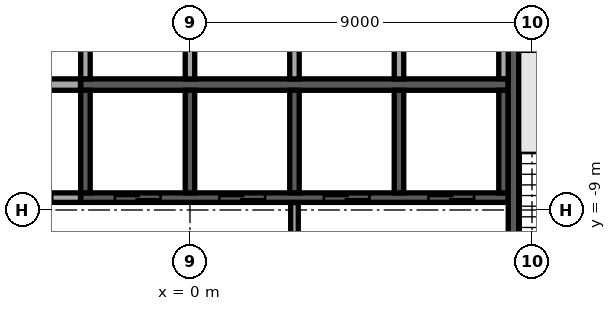
"""IFC4 building model, lengths in metres.
Left out: names, types, materials, properties, quantities, classifications, styles, units other than length and angle.
Written with IfcOpenShell. Run it as: python <this file> out.ifc"""

import sys

from ifc_helpers import new_model, si_unit, direction, frame, frame_2d, origin, place, context, subcontext, project, spatial, rectangle, extrude, element, fill, save


model = new_model("IFC4")
c1 = context("Model", 3, precision=1e-05, world=origin(), true_north=direction((0.0, 1.0)))
c2 = subcontext(c1, "Body", "Model", "MODEL_VIEW")
j1 = project(units=[si_unit("LENGTHUNIT", "METRE"), si_unit("PLANEANGLEUNIT", "RADIAN")], contexts=[c1])
p1 = place(None, origin())
s1 = spatial("IfcSite", under=j1, at=p1, CompositionType="ELEMENT")
p2 = place(p1, origin())
s2 = spatial("IfcBuilding", under=s1, at=p2, CompositionType="ELEMENT")
p3 = place(p2, frame((0.0, 0.0, 197.3)))
s3 = spatial("IfcBuildingStorey", under=s2, at=p3, CompositionType="ELEMENT", Elevation=197.3)
p4 = place(p3, frame((-2.875, -5.7, 0.0), z_axis=(0.0, 0.0, 1.0), x_axis=(1.0, 0.0, 0.0)))
e1 = element("IfcWall", 1, at=p4, inside=s3, PredefinedType="SOLIDWALL", context=c2, shape_type="SweptSolid", body=[
    extrude(rectangle(XDim=11.25, YDim=0.3, at=frame_2d((5.625, 0.0))), origin(), (0.0, 0.0, 1.0), 3.62),
])
for number, where, z_axis, x_axis in (
    (2, (-2.75, -5.55, 0.0), (0.0, 0.0, 1.0), (0.0, 1.0, 0.0)),
    (3, (0.0, -5.55, 0.0), (0.0, 0.0, 1.0), (0.0, 1.0, 0.0)),
    (4, (2.75, -5.55, 0.0), (0.0, 0.0, 1.0), (0.0, 1.0, 0.0)),
    (5, (5.5, -5.55, 0.0), (0.0, 0.0, 1.0), (0.0, 1.0, 0.0)),
):
    element("IfcWall", number, at=place(p3, frame(where, z_axis=z_axis, x_axis=x_axis)), inside=s3, PredefinedType="SOLIDWALL", context=c2, shape_type="SweptSolid", body=[
        extrude(rectangle(XDim=2.7, YDim=0.25, at=frame_2d((1.35, 0.0))), origin(), (0.0, 0.0, 1.0), 3.62),
    ])
p5 = place(p3, frame((-2.875, -8.675, 0.0), z_axis=(0.0, 0.0, 1.0), x_axis=(1.0, 0.0, 0.0)))
e6 = element("IfcWall", 6, at=p5, inside=s3, PredefinedType="SOLIDWALL", context=c2, shape_type="SweptSolid", body=[
    extrude(rectangle(XDim=11.25, YDim=0.25, at=frame_2d((5.625, 0.0))), origin(), (0.0, 0.0, 1.0), 3.62),
])
p6 = place(p5, frame((0.9, 0.0, 0.0)))
e7 = element("IfcOpeningElement", 7, at=p6, cuts=e6, PredefinedType="OPENING", context=c2, shape_type="SweptSolid", body=[
    extrude(rectangle(XDim=1.2, YDim=2.1, at=frame_2d((0.6, 1.05))), frame((0.0, 0.135, 0.0), z_axis=(0.0, -1.0, 0.0), x_axis=(1.0, 0.0, 0.0)), (0.0, 0.0, 1.0), 0.27),
])
p7 = place(p5, frame((3.65, 0.0, 0.0)))
e8 = element("IfcOpeningElement", 8, at=p7, cuts=e6, PredefinedType="OPENING", context=c2, shape_type="SweptSolid", body=[
    extrude(rectangle(XDim=1.2, YDim=2.1, at=frame_2d((0.6, 1.05))), frame((0.0, 0.135, 0.0), z_axis=(0.0, -1.0, 0.0), x_axis=(1.0, 0.0, 0.0)), (0.0, 0.0, 1.0), 0.27),
])
p8 = place(p5, frame((6.4, 0.0, 0.0)))
e9 = element("IfcOpeningElement", 9, at=p8, cuts=e6, PredefinedType="OPENING", context=c2, shape_type="SweptSolid", body=[
    extrude(rectangle(XDim=1.2, YDim=2.1, at=frame_2d((0.6, 1.05))), frame((0.0, 0.135, 0.0), z_axis=(0.0, -1.0, 0.0), x_axis=(1.0, 0.0, 0.0)), (0.0, 0.0, 1.0), 0.27),
])
p9 = place(p5, frame((9.15, 0.0, 0.0)))
e10 = element("IfcOpeningElement", 10, at=p9, cuts=e6, PredefinedType="OPENING", context=c2, shape_type="SweptSolid", body=[
    extrude(rectangle(XDim=1.2, YDim=2.1, at=frame_2d((0.6, 1.05))), frame((0.0, 0.135, 0.0), z_axis=(0.0, -1.0, 0.0), x_axis=(1.0, 0.0, 0.0)), (0.0, 0.0, 1.0), 0.27),
])
for number, where, z_axis, x_axis in (
    (11, (-2.75, -8.55, 0.0), (0.0, 0.0, 1.0), (0.0, 1.0, 0.0)),
    (12, (0.0, -8.55, 0.0), (0.0, 0.0, 1.0), (0.0, 1.0, 0.0)),
    (13, (2.75, -8.55, 0.0), (0.0, 0.0, 1.0), (0.0, 1.0, 0.0)),
    (14, (5.5, -8.55, 0.0), (0.0, 0.0, 1.0), (0.0, 1.0, 0.0)),
    (15, (8.25, -8.55, 0.0), (0.0, 0.0, 1.0), (0.0, 1.0, 0.0)),
):
    element("IfcWall", number, at=place(p3, frame(where, z_axis=z_axis, x_axis=x_axis)), inside=s3, PredefinedType="SOLIDWALL", context=c2, shape_type="SweptSolid", body=[
        extrude(rectangle(XDim=2.7, YDim=0.25, at=frame_2d((1.35, 0.0))), origin(), (0.0, 0.0, 1.0), 3.62),
    ])
p10 = place(p3, frame((8.512, -4.55, 0.0), z_axis=(0.0, 0.0, 1.0), x_axis=(0.0, -1.0, 0.0)))
e16 = element("IfcWall", 16, at=p10, inside=s3, PredefinedType="SOLIDWALL", context=c2, shape_type="SweptSolid", body=[
    extrude(rectangle(XDim=7.25, YDim=0.275, at=frame_2d((3.625, 0.0))), origin(), (0.0, 0.0, 1.0), 3.62),
])
p11 = place(p10, frame((6.0, 0.0, 0.0)))
e17 = element("IfcOpeningElement", 17, at=p11, cuts=e16, PredefinedType="OPENING", context=c2, shape_type="SweptSolid", body=[
    extrude(rectangle(XDim=1.0, YDim=2.1, at=frame_2d((0.5, 1.05))), frame((0.0, 0.147, 0.0), z_axis=(0.0, -1.0, 0.0), x_axis=(1.0, 0.0, 0.0)), (0.0, 0.0, 1.0), 0.295),
])
p12 = place(p3, frame((2.75, -11.795, 0.0), z_axis=(0.0, 0.0, 1.0), x_axis=(0.0, 1.0, 0.0)))
e18 = element("IfcWall", 18, at=p12, inside=s3, PredefinedType="PARTITIONING", context=c2, shape_type="SweptSolid", body=[
    extrude(rectangle(XDim=2.99, YDim=0.2, at=frame_2d((1.495, 0.0))), origin(), (0.0, 0.0, 1.0), 3.62),
])
p13 = place(p3, frame((-8.37, -8.675, 0.0), z_axis=(0.0, 0.0, 1.0), x_axis=(1.0, 0.0, 0.0)))
e19 = element("IfcWall", 19, at=p13, inside=s3, PredefinedType="PARTITIONING", context=c2, shape_type="SweptSolid", body=[
    extrude(rectangle(XDim=5.49, YDim=0.25, at=frame_2d((2.745, 0.0))), origin(), (0.0, 0.0, 1.0), 3.62),
])
p14 = place(p13, frame((0.995, 0.0, 0.0)))
e20 = element("IfcOpeningElement", 20, at=p14, cuts=e19, PredefinedType="OPENING", context=c2, shape_type="SweptSolid", body=[
    extrude(rectangle(XDim=1.0, YDim=2.1, at=frame_2d((0.5, 1.05))), frame((0.0, 0.135, 0.0), z_axis=(0.0, -1.0, 0.0), x_axis=(1.0, 0.0, 0.0)), (0.0, 0.0, 1.0), 0.27),
])
p15 = place(p13, frame((3.745, 0.0, 0.0)))
e21 = element("IfcOpeningElement", 21, at=p15, cuts=e19, PredefinedType="OPENING", context=c2, shape_type="SweptSolid", body=[
    extrude(rectangle(XDim=1.0, YDim=2.1, at=frame_2d((0.5, 1.05))), frame((0.0, 0.135, 0.0), z_axis=(0.0, -1.0, 0.0), x_axis=(1.0, 0.0, 0.0)), (0.0, 0.0, 1.0), 0.27),
])
p16 = place(p3, frame((-8.35, -5.7, 0.0), z_axis=(0.0, 0.0, 1.0), x_axis=(1.0, 0.0, 0.0)))
e22 = element("IfcWall", 22, at=p16, inside=s3, PredefinedType="PARTITIONING", context=c2, shape_type="SweptSolid", body=[
    extrude(rectangle(XDim=5.47, YDim=0.3, at=frame_2d((2.735, 0.0))), origin(), (0.0, 0.0, 1.0), 3.62),
])
p17 = place(p3, frame((8.25, -5.545, 0.0), z_axis=(0.0, 0.0, 1.0), x_axis=(0.0, 1.0, 0.0)))
e23 = element("IfcWall", 23, at=p17, inside=s3, PredefinedType="PARTITIONING", context=c2, shape_type="SweptSolid", body=[
    extrude(rectangle(XDim=2.69, YDim=0.25, at=frame_2d((1.345, 0.0))), origin(), (0.0, 0.0, 1.0), 3.62),
])
p18 = place(p3, frame((-1.073, -34.773, 0.0), z_axis=(0.0, 0.0, 1.0), x_axis=(0.731351780381, 0.682000420333, 0.0)))
e24 = element("IfcWall", 24, at=p18, inside=s3, PredefinedType="STANDARD", context=c2, shape_type="SweptSolid", body=[
    extrude(rectangle(XDim=49.0, YDim=0.6, at=frame_2d((24.5, 0.0))), origin(), (0.0, 0.0, 1.0), 3.62),
])
p19 = place(p18, frame((1.227, 0.0, 0.9)))
e25 = element("IfcOpeningElement", 25, at=p19, cuts=e24, PredefinedType="OPENING", context=c2, shape_type="SweptSolid", body=[
    extrude(rectangle(XDim=2.0, YDim=2.1, at=frame_2d((1.0, 1.05))), frame((0.0, 0.31, 0.0), z_axis=(0.0, -1.0, 0.0), x_axis=(1.0, 0.0, 0.0)), (0.0, 0.0, 1.0), 0.62),
])
p20 = place(p18, frame((5.682, 0.0, 0.9)))
e26 = element("IfcOpeningElement", 26, at=p20, cuts=e24, PredefinedType="OPENING", context=c2, shape_type="SweptSolid", body=[
    extrude(rectangle(XDim=2.0, YDim=2.1, at=frame_2d((1.0, 1.05))), frame((0.0, 0.31, 0.0), z_axis=(0.0, -1.0, 0.0), x_axis=(1.0, 0.0, 0.0)), (0.0, 0.0, 1.0), 0.62),
])
p21 = place(p18, frame((14.591, 0.0, 0.9)))
e27 = element("IfcOpeningElement", 27, at=p21, cuts=e24, PredefinedType="OPENING", context=c2, shape_type="SweptSolid", body=[
    extrude(rectangle(XDim=2.0, YDim=2.1, at=frame_2d((1.0, 1.05))), frame((0.0, 0.31, 0.0), z_axis=(0.0, -1.0, 0.0), x_axis=(1.0, 0.0, 0.0)), (0.0, 0.0, 1.0), 0.62),
])
p22 = place(p18, frame((19.045, 0.0, 0.9)))
e28 = element("IfcOpeningElement", 28, at=p22, cuts=e24, PredefinedType="OPENING", context=c2, shape_type="SweptSolid", body=[
    extrude(rectangle(XDim=2.0, YDim=2.1, at=frame_2d((1.0, 1.05))), frame((0.0, 0.31, 0.0), z_axis=(0.0, -1.0, 0.0), x_axis=(1.0, 0.0, 0.0)), (0.0, 0.0, 1.0), 0.62),
])
p23 = place(p18, frame((23.5, 0.0, 0.9)))
e29 = element("IfcOpeningElement", 29, at=p23, cuts=e24, PredefinedType="OPENING", context=c2, shape_type="SweptSolid", body=[
    extrude(rectangle(XDim=2.0, YDim=2.1, at=frame_2d((1.0, 1.05))), frame((0.0, 0.31, 0.0), z_axis=(0.0, -1.0, 0.0), x_axis=(1.0, 0.0, 0.0)), (0.0, 0.0, 1.0), 0.62),
])
p24 = place(p18, frame((27.955, 0.0, 0.9)))
e30 = element("IfcOpeningElement", 30, at=p24, cuts=e24, PredefinedType="OPENING", context=c2, shape_type="SweptSolid", body=[
    extrude(rectangle(XDim=2.0, YDim=2.1, at=frame_2d((1.0, 1.05))), frame((0.0, 0.31, 0.0), z_axis=(0.0, -1.0, 0.0), x_axis=(1.0, 0.0, 0.0)), (0.0, 0.0, 1.0), 0.62),
])
p25 = place(p18, frame((32.409, 0.0, 0.9)))
e31 = element("IfcOpeningElement", 31, at=p25, cuts=e24, PredefinedType="OPENING", context=c2, shape_type="SweptSolid", body=[
    extrude(rectangle(XDim=2.0, YDim=2.1, at=frame_2d((1.0, 1.05))), frame((0.0, 0.31, 0.0), z_axis=(0.0, -1.0, 0.0), x_axis=(1.0, 0.0, 0.0)), (0.0, 0.0, 1.0), 0.62),
])
p26 = place(p18, frame((36.864, 0.0, 0.9)))
e32 = element("IfcOpeningElement", 32, at=p26, cuts=e24, PredefinedType="OPENING", context=c2, shape_type="SweptSolid", body=[
    extrude(rectangle(XDim=2.0, YDim=2.1, at=frame_2d((1.0, 1.05))), frame((0.0, 0.31, 0.0), z_axis=(0.0, -1.0, 0.0), x_axis=(1.0, 0.0, 0.0)), (0.0, 0.0, 1.0), 0.62),
])
p27 = place(p18, frame((41.318, 0.0, 0.9)))
e33 = element("IfcOpeningElement", 33, at=p27, cuts=e24, PredefinedType="OPENING", context=c2, shape_type="SweptSolid", body=[
    extrude(rectangle(XDim=2.0, YDim=2.1, at=frame_2d((1.0, 1.05))), frame((0.0, 0.31, 0.0), z_axis=(0.0, -1.0, 0.0), x_axis=(1.0, 0.0, 0.0)), (0.0, 0.0, 1.0), 0.62),
])
p28 = place(p18, frame((45.773, 0.0, 0.9)))
e34 = element("IfcOpeningElement", 34, at=p28, cuts=e24, PredefinedType="OPENING", context=c2, shape_type="SweptSolid", body=[
    extrude(rectangle(XDim=2.0, YDim=2.1, at=frame_2d((1.0, 1.05))), frame((0.0, 0.31, 0.0), z_axis=(0.0, -1.0, 0.0), x_axis=(1.0, 0.0, 0.0)), (0.0, 0.0, 1.0), 0.62),
])
p29 = place(p3, frame((1.576, -24.793, 0.0), z_axis=(0.0, 0.0, 1.0), x_axis=(0.731351215564, 0.68200102602, 0.0)))
e35 = element("IfcWall", 35, at=p29, inside=s3, PredefinedType="PARTITIONING", context=c2, shape_type="SweptSolid", body=[
    extrude(rectangle(XDim=31.513, YDim=0.15, at=frame_2d((15.757, 0.0))), origin(), (0.0, 0.0, 1.0), 3.17),
])
p30 = place(p29, frame((2.3, 0.0, 0.0)))
e36 = element("IfcOpeningElement", 36, at=p30, cuts=e35, PredefinedType="OPENING", context=c2, shape_type="SweptSolid", body=[
    extrude(rectangle(XDim=1.8, YDim=2.1, at=frame_2d((0.9, 1.05))), frame((0.0, 0.085, 0.0), z_axis=(0.0, -1.0, 0.0), x_axis=(1.0, 0.0, 0.0)), (0.0, 0.0, 1.0), 0.17),
])
p31 = place(p29, frame((11.883, 0.0, 0.0)))
e37 = element("IfcOpeningElement", 37, at=p31, cuts=e35, PredefinedType="OPENING", context=c2, shape_type="SweptSolid", body=[
    extrude(rectangle(XDim=1.0, YDim=2.1, at=frame_2d((0.5, 1.05))), frame((0.0, 0.085, 0.0), z_axis=(0.0, -1.0, 0.0), x_axis=(1.0, 0.0, 0.0)), (0.0, 0.0, 1.0), 0.17),
])
p32 = place(p29, frame((15.726, 0.0, 0.0)))
e38 = element("IfcOpeningElement", 38, at=p32, cuts=e35, PredefinedType="OPENING", context=c2, shape_type="SweptSolid", body=[
    extrude(rectangle(XDim=1.0, YDim=2.1, at=frame_2d((0.5, 1.05))), frame((0.0, 0.085, 0.0), z_axis=(0.0, -1.0, 0.0), x_axis=(1.0, 0.0, 0.0)), (0.0, 0.0, 1.0), 0.17),
])
p33 = place(p6, origin())
e39 = element("IfcDoor", 39, at=p33, inside=s3, OperationType="DOUBLE_DOOR_SLIDING", PredefinedType="DOOR", context=c2, shape_type="SweptSolid", body=[
    extrude(rectangle(XDim=1.2, YDim=2.1, at=frame_2d((0.6, 1.05))), frame((0.0, 0.025, 0.0), z_axis=(0.0, -1.0, 0.0), x_axis=(1.0, 0.0, 0.0)), (0.0, 0.0, 1.0), 0.05),
])
fill(e7, e39)
p34 = place(p7, origin())
e40 = element("IfcDoor", 40, at=p34, inside=s3, OperationType="DOUBLE_DOOR_SLIDING", PredefinedType="DOOR", context=c2, shape_type="SweptSolid", body=[
    extrude(rectangle(XDim=1.2, YDim=2.1, at=frame_2d((0.6, 1.05))), frame((0.0, 0.025, 0.0), z_axis=(0.0, -1.0, 0.0), x_axis=(1.0, 0.0, 0.0)), (0.0, 0.0, 1.0), 0.05),
])
fill(e8, e40)
p35 = place(p8, origin())
e41 = element("IfcDoor", 41, at=p35, inside=s3, OperationType="DOUBLE_DOOR_SLIDING", PredefinedType="DOOR", context=c2, shape_type="SweptSolid", body=[
    extrude(rectangle(XDim=1.2, YDim=2.1, at=frame_2d((0.6, 1.05))), frame((0.0, 0.025, 0.0), z_axis=(0.0, -1.0, 0.0), x_axis=(1.0, 0.0, 0.0)), (0.0, 0.0, 1.0), 0.05),
])
fill(e9, e41)
p36 = place(p9, origin())
e42 = element("IfcDoor", 42, at=p36, inside=s3, OperationType="DOUBLE_DOOR_SLIDING", PredefinedType="DOOR", context=c2, shape_type="SweptSolid", body=[
    extrude(rectangle(XDim=1.2, YDim=2.1, at=frame_2d((0.6, 1.05))), frame((0.0, 0.025, 0.0), z_axis=(0.0, -1.0, 0.0), x_axis=(1.0, 0.0, 0.0)), (0.0, 0.0, 1.0), 0.05),
])
fill(e10, e42)
save(model, sys.argv[1])
